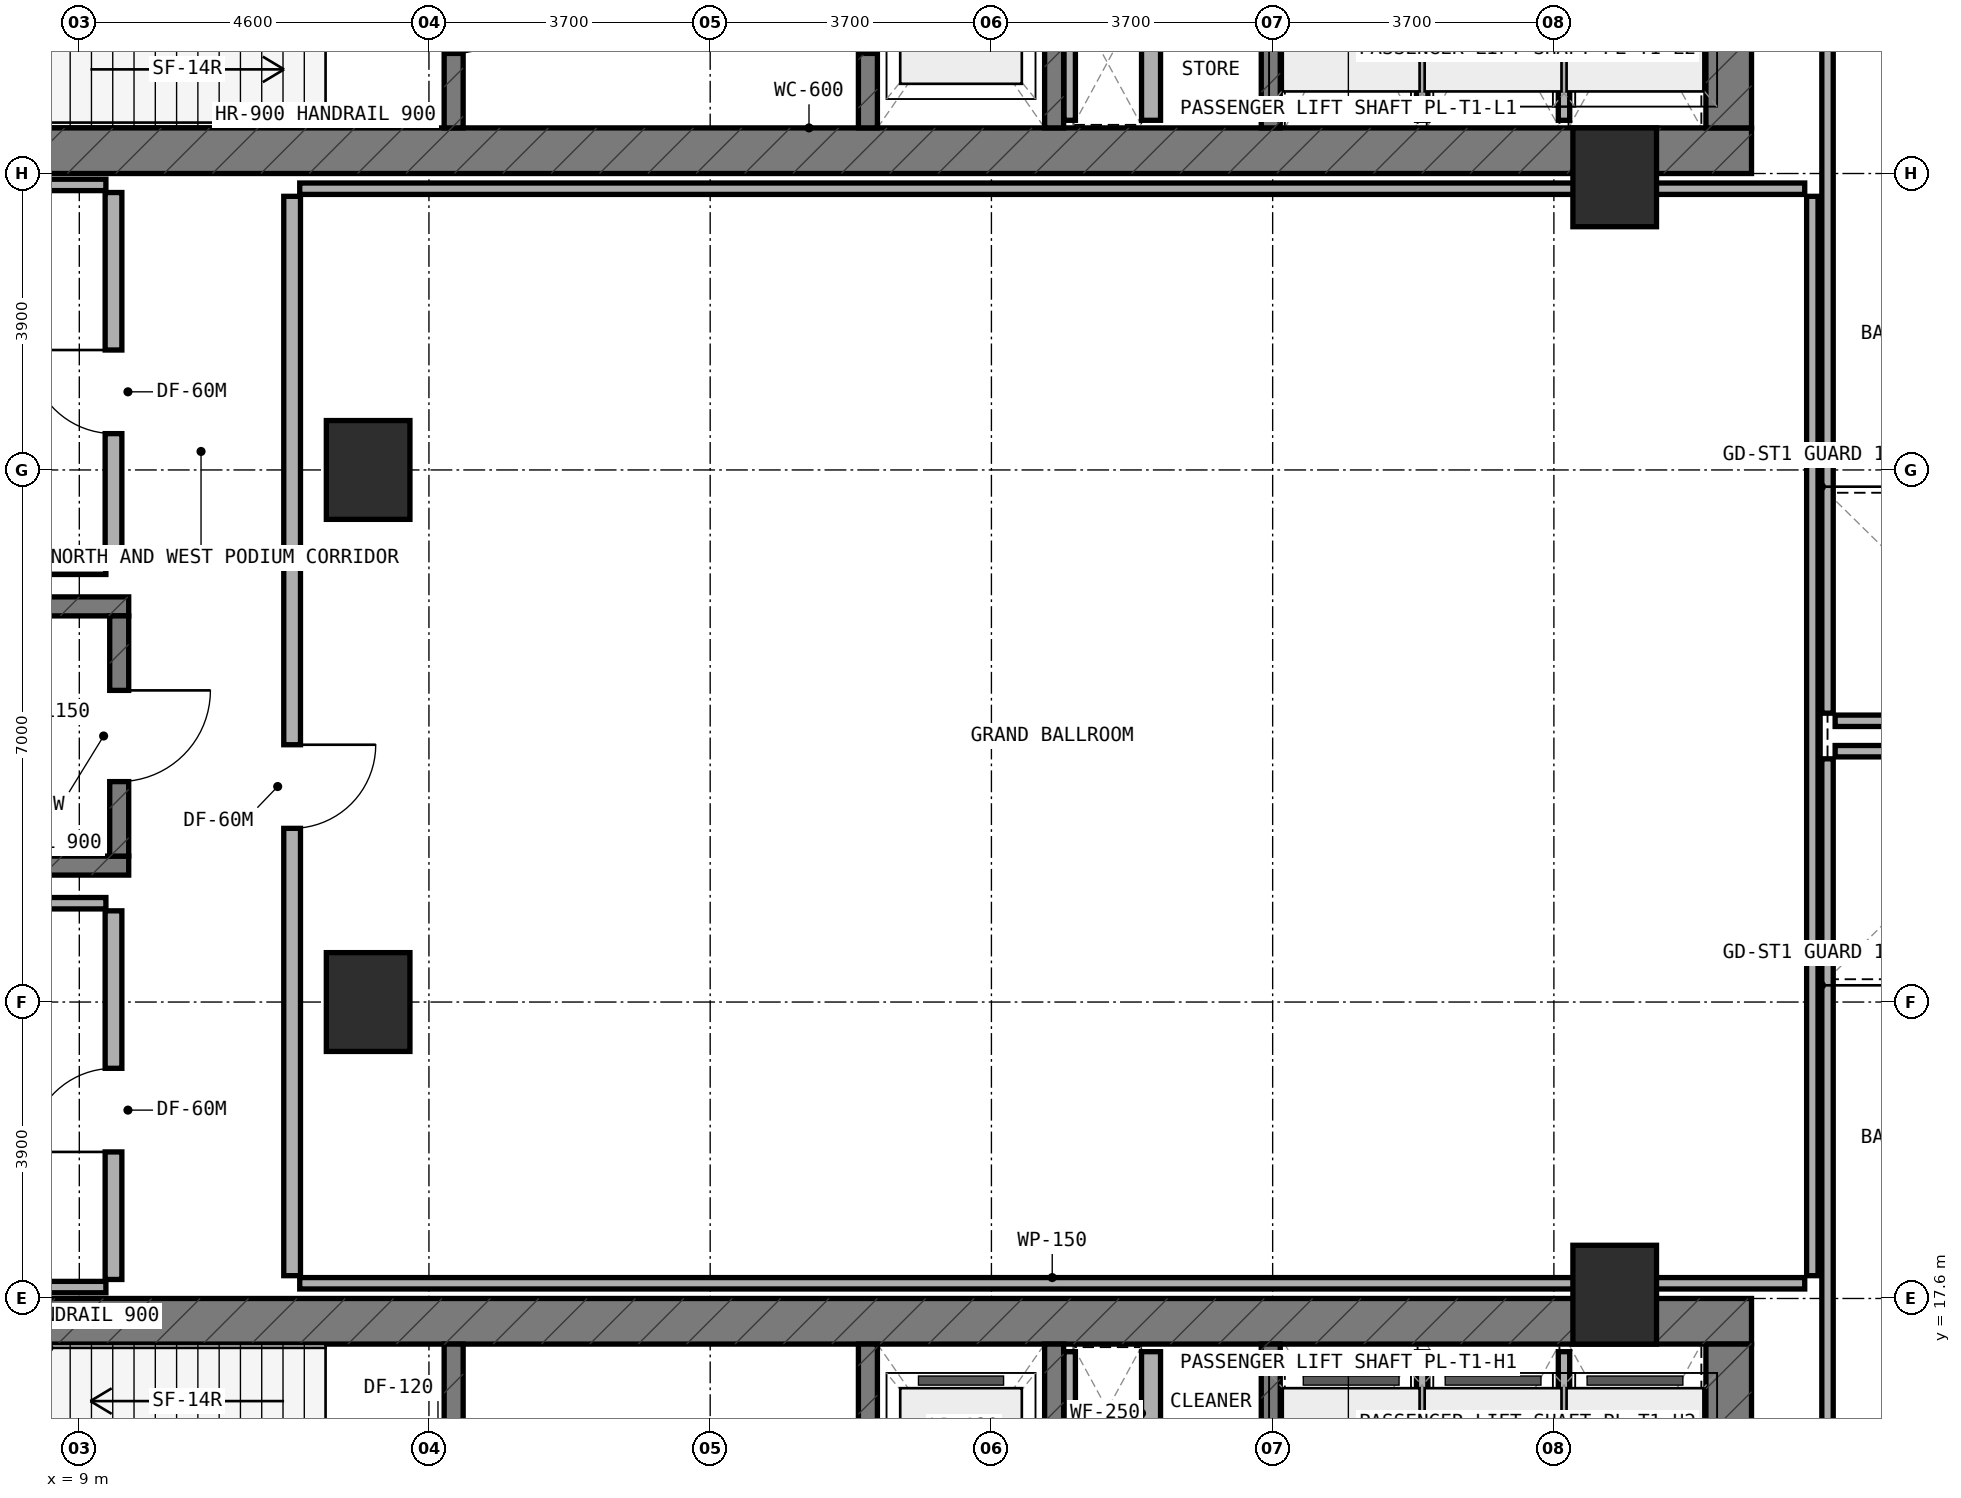
"""IFC4 building model, lengths in metres.
Left out: names, types, materials, properties, quantities, classifications, styles, units other than length and angle.
Written with IfcOpenShell. Run it as: python <this file> out.ifc"""

import sys

from ifc_helpers import new_model, si_unit, direction, frame, frame_2d, origin, origin_2d, place, context, subcontext, project, spatial, rectangle, extrude, element, fill, save


model = new_model("IFC4")
c1 = context("Model", 3, precision=1e-05, world=origin(), true_north=direction((0.0, 1.0)))
c2 = subcontext(c1, "Body", "Model", "MODEL_VIEW")
j1 = project(units=[si_unit("LENGTHUNIT", "METRE"), si_unit("PLANEANGLEUNIT", "RADIAN")], contexts=[c1])
p1 = place(None, origin())
s1 = spatial("IfcSite", under=j1, at=p1, CompositionType="ELEMENT")
p2 = place(p1, origin())
s2 = spatial("IfcBuilding", under=s1, at=p2, CompositionType="ELEMENT")
p3 = place(p2, frame((0.0, 0.0, 10.2)))
s3 = spatial("IfcBuildingStorey", under=s2, at=p3, CompositionType="ELEMENT", Elevation=10.2)
p4 = place(p3, frame((6.2, 32.7, 0.0), z_axis=(0.0, 0.0, 1.0), x_axis=(1.0, 0.0, 0.0)))
e1 = element("IfcWall", 1, at=p4, inside=s3, PredefinedType="SHEAR", context=c2, shape_type="SweptSolid", body=[
    extrude(rectangle(XDim=24.8, YDim=0.6, at=frame_2d((12.4, 0.0))), origin(), (0.0, 0.0, 1.0), 4.8),
])
p5 = place(p3, frame((30.7, 33.0, 0.0), z_axis=(0.0, 0.0, 1.0), x_axis=(0.0, 1.0, 0.0)))
e2 = element("IfcWall", 2, at=p5, inside=s3, PredefinedType="SHEAR", context=c2, shape_type="SweptSolid", body=[
    extrude(rectangle(XDim=3.16, YDim=0.6, at=frame_2d((1.58, 0.0))), origin(), (0.0, 0.0, 1.0), 4.8),
])
p6 = place(p3, frame((13.925, 33.0, 0.0), z_axis=(0.0, 0.0, 1.0), x_axis=(0.0, 1.0, 0.0)))
e3 = element("IfcWall", 3, at=p6, inside=s3, PredefinedType="STANDARD", context=c2, shape_type="SweptSolid", body=[
    extrude(rectangle(XDim=3.16, YDim=0.25, at=frame_2d((1.58, 0.0))), origin(), (0.0, 0.0, 1.0), 4.45),
])
p7 = place(p6, frame((0.98, 0.0, 0.0)))
e4 = element("IfcOpeningElement", 4, at=p7, cuts=e3, PredefinedType="OPENING", context=c2, shape_type="SweptSolid", body=[
    extrude(rectangle(XDim=1.1, YDim=2.15, at=frame_2d((0.55, 1.075))), frame((0.0, 0.135, 0.0), z_axis=(0.0, -1.0, 0.0), x_axis=(1.0, 0.0, 0.0)), (0.0, 0.0, 1.0), 0.27),
])
p8 = place(p3, frame((19.375, 33.0, 0.0), z_axis=(0.0, 0.0, 1.0), x_axis=(0.0, 1.0, 0.0)))
e5 = element("IfcWall", 5, at=p8, inside=s3, PredefinedType="STANDARD", context=c2, shape_type="SweptSolid", body=[
    extrude(rectangle(XDim=3.16, YDim=0.25, at=frame_2d((1.58, 0.0))), origin(), (0.0, 0.0, 1.0), 4.45),
])
p9 = place(p8, frame((0.98, 0.0, 0.0)))
e6 = element("IfcOpeningElement", 6, at=p9, cuts=e5, PredefinedType="OPENING", context=c2, shape_type="SweptSolid", body=[
    extrude(rectangle(XDim=1.1, YDim=2.15, at=frame_2d((0.55, 1.075))), frame((0.0, 0.135, 0.0), z_axis=(0.0, -1.0, 0.0), x_axis=(1.0, 0.0, 0.0)), (0.0, 0.0, 1.0), 0.27),
])
for number, where, z_axis, x_axis in (
    (7, (21.825, 33.0, 0.0), (0.0, 0.0, 1.0), (0.0, 1.0, 0.0)),
    (8, (24.675, 33.0, 0.0), (0.0, 0.0, 1.0), (0.0, 1.0, 0.0)),
):
    element("IfcWall", number, at=place(p3, frame(where, z_axis=z_axis, x_axis=x_axis)), inside=s3, PredefinedType="STANDARD", context=c2, shape_type="SweptSolid", body=[
        extrude(rectangle(XDim=3.16, YDim=0.25, at=frame_2d((1.58, 0.0))), origin(), (0.0, 0.0, 1.0), 4.45),
    ])
p10 = place(p3, frame((6.2, 17.3, 0.0), z_axis=(0.0, 0.0, 1.0), x_axis=(1.0, 0.0, 0.0)))
e9 = element("IfcWall", 9, at=p10, inside=s3, PredefinedType="SHEAR", context=c2, shape_type="SweptSolid", body=[
    extrude(rectangle(XDim=24.8, YDim=0.6, at=frame_2d((12.4, 0.0))), origin(), (0.0, 0.0, 1.0), 4.8),
])
p11 = place(p3, frame((30.7, 13.84, 0.0), z_axis=(0.0, 0.0, 1.0), x_axis=(0.0, 1.0, 0.0)))
e10 = element("IfcWall", 10, at=p11, inside=s3, PredefinedType="SHEAR", context=c2, shape_type="SweptSolid", body=[
    extrude(rectangle(XDim=3.16, YDim=0.6, at=frame_2d((1.58, 0.0))), origin(), (0.0, 0.0, 1.0), 4.8),
])
p12 = place(p3, frame((13.925, 13.84, 0.0), z_axis=(0.0, 0.0, 1.0), x_axis=(0.0, 1.0, 0.0)))
e11 = element("IfcWall", 11, at=p12, inside=s3, PredefinedType="STANDARD", context=c2, shape_type="SweptSolid", body=[
    extrude(rectangle(XDim=3.16, YDim=0.25, at=frame_2d((1.58, 0.0))), origin(), (0.0, 0.0, 1.0), 4.45),
])
p13 = place(p12, frame((0.98, 0.0, 0.0)))
e12 = element("IfcOpeningElement", 12, at=p13, cuts=e11, PredefinedType="OPENING", context=c2, shape_type="SweptSolid", body=[
    extrude(rectangle(XDim=1.1, YDim=2.15, at=frame_2d((0.55, 1.075))), frame((0.0, 0.135, 0.0), z_axis=(0.0, -1.0, 0.0), x_axis=(1.0, 0.0, 0.0)), (0.0, 0.0, 1.0), 0.27),
])
p14 = place(p3, frame((19.375, 13.84, 0.0), z_axis=(0.0, 0.0, 1.0), x_axis=(0.0, 1.0, 0.0)))
e13 = element("IfcWall", 13, at=p14, inside=s3, PredefinedType="STANDARD", context=c2, shape_type="SweptSolid", body=[
    extrude(rectangle(XDim=3.16, YDim=0.25, at=frame_2d((1.58, 0.0))), origin(), (0.0, 0.0, 1.0), 4.45),
])
p15 = place(p14, frame((0.98, 0.0, 0.0)))
e14 = element("IfcOpeningElement", 14, at=p15, cuts=e13, PredefinedType="OPENING", context=c2, shape_type="SweptSolid", body=[
    extrude(rectangle(XDim=1.1, YDim=2.15, at=frame_2d((0.55, 1.075))), frame((0.0, 0.135, 0.0), z_axis=(0.0, -1.0, 0.0), x_axis=(1.0, 0.0, 0.0)), (0.0, 0.0, 1.0), 0.27),
])
for number, where, z_axis, x_axis in (
    (15, (21.825, 13.84, 0.0), (0.0, 0.0, 1.0), (0.0, 1.0, 0.0)),
    (16, (24.675, 13.84, 0.0), (0.0, 0.0, 1.0), (0.0, 1.0, 0.0)),
):
    element("IfcWall", number, at=place(p3, frame(where, z_axis=z_axis, x_axis=x_axis)), inside=s3, PredefinedType="STANDARD", context=c2, shape_type="SweptSolid", body=[
        extrude(rectangle(XDim=3.16, YDim=0.25, at=frame_2d((1.58, 0.0))), origin(), (0.0, 0.0, 1.0), 4.45),
    ])
for number, where, z_axis, x_axis in (
    (17, (2.15, 23.295, 0.0), (0.0, 0.0, 1.0), (1.0, 0.0, 0.0)),
    (18, (2.15, 26.705, 0.0), (0.0, 0.0, 1.0), (1.0, 0.0, 0.0)),
):
    element("IfcWall", number, at=place(p3, frame(where, z_axis=z_axis, x_axis=x_axis)), inside=s3, PredefinedType="STANDARD", context=c2, shape_type="SweptSolid", body=[
        extrude(rectangle(XDim=7.5, YDim=0.25, at=frame_2d((3.75, 0.0))), origin(), (0.0, 0.0, 1.0), 4.8),
    ])
p16 = place(p3, frame((9.525, 23.42, 0.0), z_axis=(0.0, 0.0, 1.0), x_axis=(0.0, 1.0, 0.0)))
e19 = element("IfcWall", 19, at=p16, inside=s3, PredefinedType="STANDARD", context=c2, shape_type="SweptSolid", body=[
    extrude(rectangle(XDim=3.16, YDim=0.25, at=frame_2d((1.58, 0.0))), origin(), (0.0, 0.0, 1.0), 4.8),
])
p17 = place(p16, frame((0.98, 0.0, 0.0)))
e20 = element("IfcOpeningElement", 20, at=p17, cuts=e19, PredefinedType="OPENING", context=c2, shape_type="SweptSolid", body=[
    extrude(rectangle(XDim=1.2, YDim=2.15, at=frame_2d((0.6, 1.075))), frame((0.0, 0.135, 0.0), z_axis=(0.0, -1.0, 0.0), x_axis=(1.0, 0.0, 0.0)), (0.0, 0.0, 1.0), 0.27),
])
for number, where, z_axis, x_axis in (
    (21, (12.8, 21.5, 0.0), (0.0, 0.0, 1.0), (1.0, 0.0, 0.0)),
    (22, (12.8, 28.5, 0.0), (0.0, 0.0, 1.0), (1.0, 0.0, 0.0)),
    (23, (29.2, 17.65, 0.0), (0.0, 0.0, 1.0), (1.0, 0.0, 0.0)),
    (24, (29.2, 32.35, 0.0), (0.0, 0.0, 1.0), (1.0, 0.0, 0.0)),
):
    element("IfcColumn", number, at=place(p3, frame(where, z_axis=z_axis, x_axis=x_axis)), inside=s3, PredefinedType="COLUMN", context=c2, shape_type="SweptSolid", body=[
        extrude(rectangle(XDim=1.1, YDim=1.3, at=origin_2d()), origin(), (0.0, 0.0, 1.0), 4.8),
    ])
p18 = place(p3, frame((22.03, 33.1, 0.0), z_axis=(0.0, 0.0, 1.0), x_axis=(0.0, 1.0, 0.0)))
e25 = element("IfcWall", 25, at=p18, inside=s3, PredefinedType="PARTITIONING", context=c2, shape_type="SweptSolid", body=[
    extrude(rectangle(XDim=1.62, YDim=0.15, at=frame_2d((0.81, 0.0))), origin(), (0.0, 0.0, 1.0), 4.45),
])
p19 = place(p3, frame((23.1, 33.1, 0.0), z_axis=(0.0, 0.0, 1.0), x_axis=(0.0, 1.0, 0.0)))
e26 = element("IfcWall", 26, at=p19, inside=s3, PredefinedType="SOLIDWALL", context=c2, shape_type="SweptSolid", body=[
    extrude(rectangle(XDim=1.62, YDim=0.25, at=frame_2d((0.81, 0.0))), origin(), (0.0, 0.0, 1.0), 4.45),
])
p20 = place(p3, frame((26.667, 33.1, 0.0), z_axis=(0.0, 0.0, 1.0), x_axis=(0.0, 1.0, 0.0)))
e27 = element("IfcWall", 27, at=p20, inside=s3, PredefinedType="PARTITIONING", context=c2, shape_type="SweptSolid", body=[
    extrude(rectangle(XDim=2.96, YDim=0.15, at=frame_2d((1.48, 0.0))), origin(), (0.0, 0.0, 1.0), 4.45),
])
p21 = place(p3, frame((28.533, 33.1, 0.0), z_axis=(0.0, 0.0, 1.0), x_axis=(0.0, 1.0, 0.0)))
e28 = element("IfcWall", 28, at=p21, inside=s3, PredefinedType="PARTITIONING", context=c2, shape_type="SweptSolid", body=[
    extrude(rectangle(XDim=2.96, YDim=0.15, at=frame_2d((1.48, 0.0))), origin(), (0.0, 0.0, 1.0), 3.525),
])
p22 = place(p3, frame((22.03, 15.28, 0.0), z_axis=(0.0, 0.0, 1.0), x_axis=(0.0, 1.0, 0.0)))
e29 = element("IfcWall", 29, at=p22, inside=s3, PredefinedType="PARTITIONING", context=c2, shape_type="SweptSolid", body=[
    extrude(rectangle(XDim=1.62, YDim=0.15, at=frame_2d((0.81, 0.0))), origin(), (0.0, 0.0, 1.0), 4.45),
])
p23 = place(p3, frame((23.1, 15.28, 0.0), z_axis=(0.0, 0.0, 1.0), x_axis=(0.0, 1.0, 0.0)))
e30 = element("IfcWall", 30, at=p23, inside=s3, PredefinedType="SOLIDWALL", context=c2, shape_type="SweptSolid", body=[
    extrude(rectangle(XDim=1.62, YDim=0.25, at=frame_2d((0.81, 0.0))), origin(), (0.0, 0.0, 1.0), 4.45),
])
p24 = place(p3, frame((26.667, 13.94, 0.0), z_axis=(0.0, 0.0, 1.0), x_axis=(0.0, 1.0, 0.0)))
e31 = element("IfcWall", 31, at=p24, inside=s3, PredefinedType="PARTITIONING", context=c2, shape_type="SweptSolid", body=[
    extrude(rectangle(XDim=2.96, YDim=0.15, at=frame_2d((1.48, 0.0))), origin(), (0.0, 0.0, 1.0), 4.45),
])
p25 = place(p3, frame((28.533, 13.94, 0.0), z_axis=(0.0, 0.0, 1.0), x_axis=(0.0, 1.0, 0.0)))
e32 = element("IfcWall", 32, at=p25, inside=s3, PredefinedType="PARTITIONING", context=c2, shape_type="SweptSolid", body=[
    extrude(rectangle(XDim=2.96, YDim=0.15, at=frame_2d((1.48, 0.0))), origin(), (0.0, 0.0, 1.0), 3.525),
])
p26 = place(p3, frame((31.8, 17.9, 0.0), z_axis=(0.0, 0.0, 1.0), x_axis=(0.0, 1.0, 0.0)))
e33 = element("IfcWall", 33, at=p26, inside=s3, PredefinedType="PARTITIONING", context=c2, shape_type="SweptSolid", body=[
    extrude(rectangle(XDim=14.2, YDim=0.15, at=frame_2d((7.1, 0.0))), origin(), (0.0, 0.0, 1.0), 3.425),
])
for number, where, z_axis, x_axis in (
    (34, (11.9, 17.8, 0.0), (0.0, 0.0, 1.0), (1.0, 0.0, 0.0)),
    (35, (11.9, 32.2, 0.0), (0.0, 0.0, 1.0), (1.0, 0.0, 0.0)),
):
    element("IfcWall", number, at=place(p3, frame(where, z_axis=z_axis, x_axis=x_axis)), inside=s3, PredefinedType="PARTITIONING", context=c2, shape_type="SweptSolid", body=[
        extrude(rectangle(XDim=19.8, YDim=0.15, at=frame_2d((9.9, 0.0))), origin(), (0.0, 0.0, 1.0), 3.525),
    ])
p27 = place(p3, frame((11.8, 17.9, 0.0), z_axis=(0.0, 0.0, 1.0), x_axis=(0.0, 1.0, 0.0)))
e36 = element("IfcWall", 36, at=p27, inside=s3, PredefinedType="SOLIDWALL", context=c2, shape_type="SweptSolid", body=[
    extrude(rectangle(XDim=14.2, YDim=0.22, at=frame_2d((7.1, 0.0))), origin(), (0.0, 0.0, 1.0), 3.525),
])
p28 = place(p27, frame((5.885, 0.0, 0.0)))
e37 = element("IfcOpeningElement", 37, at=p28, cuts=e36, PredefinedType="OPENING", context=c2, shape_type="SweptSolid", body=[
    extrude(rectangle(XDim=1.1, YDim=2.1, at=frame_2d((0.55, 1.05))), frame((0.0, 0.12, 0.0), z_axis=(0.0, -1.0, 0.0), x_axis=(1.0, 0.0, 0.0)), (0.0, 0.0, 1.0), 0.24),
])
p29 = place(p3, frame((0.45, 17.75, 0.0), z_axis=(0.0, 0.0, 1.0), x_axis=(1.0, 0.0, 0.0)))
e38 = element("IfcWall", 38, at=p29, inside=s3, PredefinedType="PARTITIONING", context=c2, shape_type="SweptSolid", body=[
    extrude(rectangle(XDim=8.9, YDim=0.15, at=frame_2d((4.45, 0.0))), origin(), (0.0, 0.0, 1.0), 3.725),
])
p30 = place(p3, frame((0.45, 22.8, 0.0), z_axis=(0.0, 0.0, 1.0), x_axis=(1.0, 0.0, 0.0)))
e39 = element("IfcWall", 39, at=p30, inside=s3, PredefinedType="PARTITIONING", context=c2, shape_type="SweptSolid", body=[
    extrude(rectangle(XDim=8.9, YDim=0.15, at=frame_2d((4.45, 0.0))), origin(), (0.0, 0.0, 1.0), 3.925),
])
p31 = place(p3, frame((9.45, 17.85, 0.0), z_axis=(0.0, 0.0, 1.0), x_axis=(0.0, 1.0, 0.0)))
e40 = element("IfcWall", 40, at=p31, inside=s3, PredefinedType="SOLIDWALL", context=c2, shape_type="SweptSolid", body=[
    extrude(rectangle(XDim=4.85, YDim=0.22, at=frame_2d((2.425, 0.0))), origin(), (0.0, 0.0, 1.0), 3.525),
])
p32 = place(p31, frame((1.678, 0.0, 0.0)))
e41 = element("IfcOpeningElement", 41, at=p32, cuts=e40, PredefinedType="OPENING", context=c2, shape_type="SweptSolid", body=[
    extrude(rectangle(XDim=1.1, YDim=2.1, at=frame_2d((0.55, 1.05))), frame((0.0, 0.12, 0.0), z_axis=(0.0, -1.0, 0.0), x_axis=(1.0, 0.0, 0.0)), (0.0, 0.0, 1.0), 0.24),
])
p33 = place(p3, frame((0.45, 27.2, 0.0), z_axis=(0.0, 0.0, 1.0), x_axis=(1.0, 0.0, 0.0)))
e42 = element("IfcWall", 42, at=p33, inside=s3, PredefinedType="PARTITIONING", context=c2, shape_type="SweptSolid", body=[
    extrude(rectangle(XDim=8.9, YDim=0.15, at=frame_2d((4.45, 0.0))), origin(), (0.0, 0.0, 1.0), 3.925),
])
p34 = place(p3, frame((0.45, 32.25, 0.0), z_axis=(0.0, 0.0, 1.0), x_axis=(1.0, 0.0, 0.0)))
e43 = element("IfcWall", 43, at=p34, inside=s3, PredefinedType="PARTITIONING", context=c2, shape_type="SweptSolid", body=[
    extrude(rectangle(XDim=8.9, YDim=0.15, at=frame_2d((4.45, 0.0))), origin(), (0.0, 0.0, 1.0), 3.725),
])
p35 = place(p3, frame((9.45, 27.3, 0.0), z_axis=(0.0, 0.0, 1.0), x_axis=(0.0, 1.0, 0.0)))
e44 = element("IfcWall", 44, at=p35, inside=s3, PredefinedType="SOLIDWALL", context=c2, shape_type="SweptSolid", body=[
    extrude(rectangle(XDim=4.85, YDim=0.22, at=frame_2d((2.425, 0.0))), origin(), (0.0, 0.0, 1.0), 3.525),
])
p36 = place(p35, frame((1.678, 0.0, 0.0)))
e45 = element("IfcOpeningElement", 45, at=p36, cuts=e44, PredefinedType="OPENING", context=c2, shape_type="SweptSolid", body=[
    extrude(rectangle(XDim=1.1, YDim=2.1, at=frame_2d((0.55, 1.05))), frame((0.0, 0.12, 0.0), z_axis=(0.0, -1.0, 0.0), x_axis=(1.0, 0.0, 0.0)), (0.0, 0.0, 1.0), 0.24),
])
p37 = place(p3, frame((32.0, 13.4, 0.0), z_axis=(0.0, 0.0, 1.0), x_axis=(0.0, 1.0, 0.0)))
e46 = element("IfcWall", 46, at=p37, inside=s3, PredefinedType="PARTITIONING", context=c2, shape_type="SweptSolid", body=[
    extrude(rectangle(XDim=11.3, YDim=0.15, at=frame_2d((5.65, 0.0))), origin(), (0.0, 0.0, 1.0), 3.425),
])
p38 = place(p3, frame((32.1, 24.8, 0.0), z_axis=(0.0, 0.0, 1.0), x_axis=(1.0, 0.0, 0.0)))
e47 = element("IfcWall", 47, at=p38, inside=s3, PredefinedType="PARTITIONING", context=c2, shape_type="SweptSolid", body=[
    extrude(rectangle(XDim=4.65, YDim=0.15, at=frame_2d((2.325, 0.0))), origin(), (0.0, 0.0, 1.0), 3.975),
])
p39 = place(p3, frame((32.0, 25.3, 0.0), z_axis=(0.0, 0.0, 1.0), x_axis=(0.0, 1.0, 0.0)))
e48 = element("IfcWall", 48, at=p39, inside=s3, PredefinedType="PARTITIONING", context=c2, shape_type="SweptSolid", body=[
    extrude(rectangle(XDim=11.3, YDim=0.15, at=frame_2d((5.65, 0.0))), origin(), (0.0, 0.0, 1.0), 3.525),
])
p40 = place(p3, frame((32.1, 25.2, 0.0), z_axis=(0.0, 0.0, 1.0), x_axis=(1.0, 0.0, 0.0)))
e49 = element("IfcWall", 49, at=p40, inside=s3, PredefinedType="PARTITIONING", context=c2, shape_type="SweptSolid", body=[
    extrude(rectangle(XDim=4.65, YDim=0.15, at=frame_2d((2.325, 0.0))), origin(), (0.0, 0.0, 1.0), 3.975),
])
p41 = place(p7, frame((1.1, 0.0, 0.0), z_axis=(0.0, 0.0, 1.0), x_axis=(-1.0, 0.0, 0.0)))
e50 = element("IfcDoor", 50, at=p41, inside=s3, OperationType="SINGLE_SWING_LEFT", PredefinedType="DOOR", context=c2, shape_type="SweptSolid", body=[
    extrude(rectangle(XDim=1.1, YDim=2.15, at=frame_2d((0.55, 1.075))), frame((0.0, 0.025, 0.0), z_axis=(0.0, -1.0, 0.0), x_axis=(1.0, 0.0, 0.0)), (0.0, 0.0, 1.0), 0.05),
])
fill(e4, e50)
p42 = place(p9, origin())
e51 = element("IfcDoor", 51, at=p42, inside=s3, OperationType="DOUBLE_DOOR_SLIDING", PredefinedType="DOOR", context=c2, shape_type="SweptSolid", body=[
    extrude(rectangle(XDim=1.1, YDim=2.15, at=frame_2d((0.55, 1.075))), frame((0.0, 0.025, 0.0), z_axis=(0.0, -1.0, 0.0), x_axis=(1.0, 0.0, 0.0)), (0.0, 0.0, 1.0), 0.05),
])
fill(e6, e51)
p43 = place(p17, frame((1.2, 0.0, 0.0), z_axis=(0.0, 0.0, 1.0), x_axis=(-1.0, 0.0, 0.0)))
e52 = element("IfcDoor", 52, at=p43, inside=s3, OperationType="SINGLE_SWING_LEFT", PredefinedType="DOOR", context=c2, shape_type="SweptSolid", body=[
    extrude(rectangle(XDim=1.2, YDim=2.15, at=frame_2d((0.6, 1.075))), frame((0.0, 0.025, 0.0), z_axis=(0.0, -1.0, 0.0), x_axis=(1.0, 0.0, 0.0)), (0.0, 0.0, 1.0), 0.05),
])
fill(e20, e52)
p44 = place(p28, frame((1.1, 0.0, 0.0), z_axis=(0.0, 0.0, 1.0), x_axis=(-1.0, 0.0, 0.0)))
e53 = element("IfcDoor", 53, at=p44, inside=s3, OperationType="SINGLE_SWING_LEFT", PredefinedType="DOOR", context=c2, shape_type="SweptSolid", body=[
    extrude(rectangle(XDim=1.1, YDim=2.1, at=frame_2d((0.55, 1.05))), frame((0.0, 0.025, 0.0), z_axis=(0.0, -1.0, 0.0), x_axis=(1.0, 0.0, 0.0)), (0.0, 0.0, 1.0), 0.05),
])
fill(e37, e53)
p45 = place(p32, origin())
e54 = element("IfcDoor", 54, at=p45, inside=s3, OperationType="SINGLE_SWING_LEFT", PredefinedType="DOOR", context=c2, shape_type="SweptSolid", body=[
    extrude(rectangle(XDim=1.1, YDim=2.1, at=frame_2d((0.55, 1.05))), frame((0.0, 0.025, 0.0), z_axis=(0.0, -1.0, 0.0), x_axis=(1.0, 0.0, 0.0)), (0.0, 0.0, 1.0), 0.05),
])
fill(e41, e54)
p46 = place(p36, origin())
e55 = element("IfcDoor", 55, at=p46, inside=s3, OperationType="SINGLE_SWING_RIGHT", PredefinedType="DOOR", context=c2, shape_type="SweptSolid", body=[
    extrude(rectangle(XDim=1.1, YDim=2.1, at=frame_2d((0.55, 1.05))), frame((0.0, 0.025, 0.0), z_axis=(0.0, -1.0, 0.0), x_axis=(1.0, 0.0, 0.0)), (0.0, 0.0, 1.0), 0.05),
])
fill(e45, e55)
save(model, sys.argv[1])
